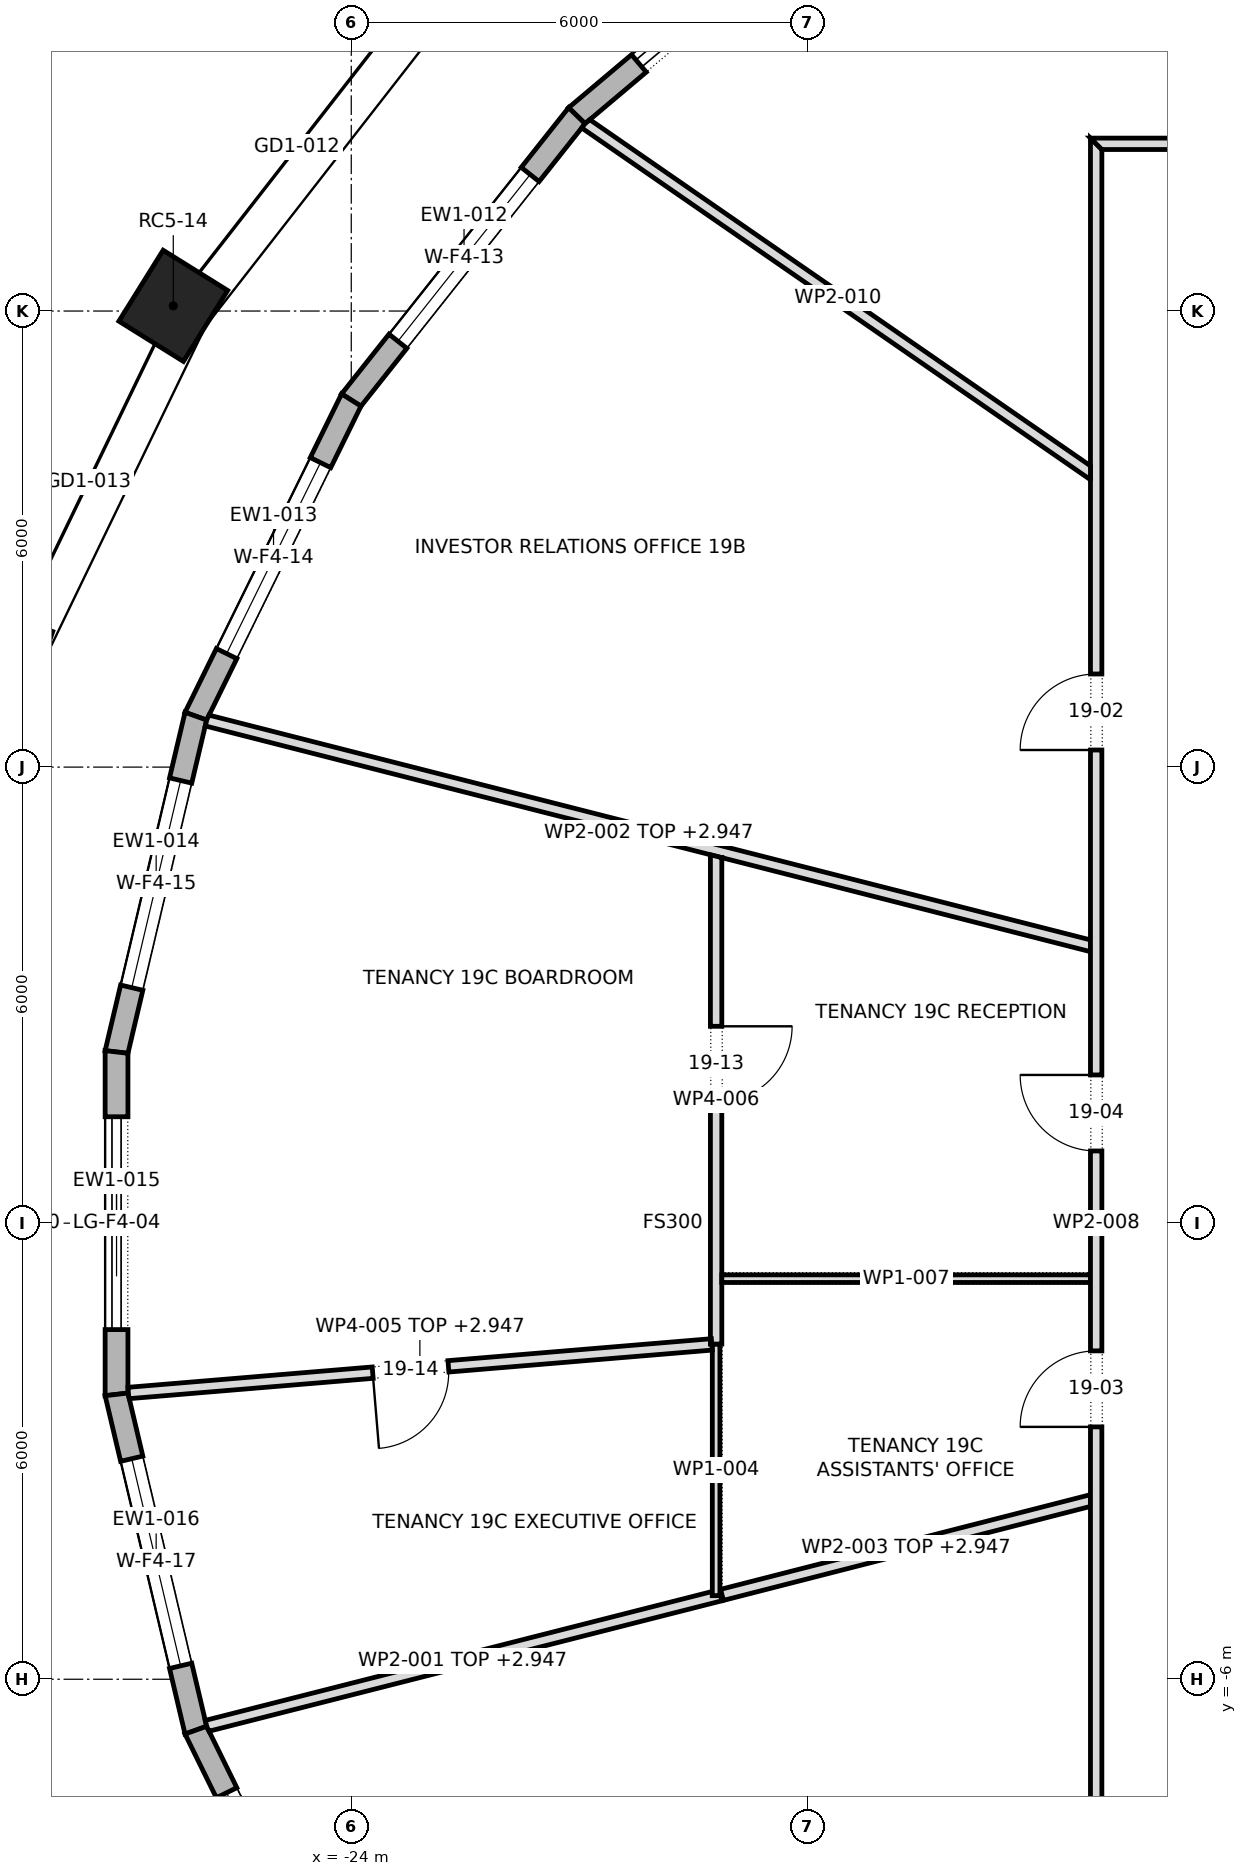
"""IFC4 building model, lengths in metres.
Left out: names, types, materials, properties, quantities, classifications, styles, units other than length and angle.
Written with IfcOpenShell. Run it as: python <this file> out.ifc"""

import sys

from ifc_helpers import new_model, si_unit, direction, frame, frame_2d, origin, origin_2d, place, context, subcontext, project, spatial, polyline, rectangle, outline, extrude, element, fill, save


model = new_model("IFC4")
c1 = context("Model", 3, precision=1e-05, world=origin(), true_north=direction((0.0, 1.0)))
c2 = subcontext(c1, "Body", "Model", "MODEL_VIEW")
j1 = project(units=[si_unit("LENGTHUNIT", "METRE"), si_unit("PLANEANGLEUNIT", "RADIAN")], contexts=[c1])
p1 = place(None, origin())
s1 = spatial("IfcSite", under=j1, at=p1, CompositionType="ELEMENT")
p2 = place(p1, origin())
s2 = spatial("IfcBuilding", under=s1, at=p2, CompositionType="ELEMENT")
p3 = place(p2, frame((0.0, 0.0, 268.3)))
s3 = spatial("IfcBuildingStorey", under=s2, at=p3, CompositionType="ELEMENT", Elevation=268.3)
for number, where, z_axis, x_axis in (
    (1, (-26.342, 12.069, 0.0), (0.0, 0.0, 1.0), (-0.529, -0.849, 0.0)),
    (2, (-28.582, 7.432, 0.0), (0.0, 0.0, 1.0), (-0.334, -0.943, 0.0)),
    (3, (-28.582, -7.432, 0.0), (0.0, 0.0, 1.0), (0.334, -0.943, 0.0)),
):
    element("IfcColumn", number, at=place(p3, frame(where, z_axis=z_axis, x_axis=x_axis)), inside=s3, PredefinedType="COLUMN", context=c2, shape_type="SweptSolid", body=[
        extrude(rectangle(XDim=1.1, YDim=1.0, at=origin_2d()), origin(), (0.0, 0.0, 1.0), 4.0),
    ])
p4 = place(p3, frame((-17.258, 17.75, 0.0), z_axis=(0.0, 0.0, 1.0), x_axis=(-0.764832940795, -0.644228664897, 0.0)))
e4 = element("IfcWall", 4, at=p4, inside=s3, PredefinedType="STANDARD", context=c2, shape_type="SweptSolid", body=[
    extrude(outline(polyline([(-0.014, -0.15), (4.95, -0.15), (4.92, 0.15), (0.014, 0.15), (-0.014, -0.15)])), origin(), (0.0, 0.0, 1.0), 3.7),
])
p5 = place(p4, frame((1.068, 0.0, 0.0)))
e5 = element("IfcOpeningElement", 5, at=p5, cuts=e4, PredefinedType="OPENING", context=c2, shape_type="SweptSolid", body=[
    extrude(rectangle(XDim=2.8, YDim=3.25, at=frame_2d((1.4, 1.625))), frame((0.0, 0.162, 0.0), z_axis=(0.0, -1.0, 0.0), x_axis=(1.0, 0.0, 0.0)), (0.0, 0.0, 1.0), 0.324),
])
p6 = place(p3, frame((-21.032, 14.57, 0.0), z_axis=(0.0, 0.0, 1.0), x_axis=(-0.621434755851, -0.783465917715, 0.0)))
e6 = element("IfcWall", 6, at=p6, inside=s3, PredefinedType="STANDARD", context=c2, shape_type="SweptSolid", body=[
    extrude(outline(polyline([(-0.015, -0.15), (4.791, -0.15), (4.759, 0.15), (0.015, 0.15), (-0.015, -0.15)])), origin(), (0.0, 0.0, 1.0), 3.7),
])
p7 = place(p6, frame((0.987, 0.0, 0.6)))
e7 = element("IfcOpeningElement", 7, at=p7, cuts=e6, PredefinedType="OPENING", context=c2, shape_type="SweptSolid", body=[
    extrude(rectangle(XDim=2.8, YDim=2.65, at=frame_2d((1.4, 1.325))), frame((0.0, 0.162, 0.0), z_axis=(0.0, -1.0, 0.0), x_axis=(1.0, 0.0, 0.0)), (0.0, 0.0, 1.0), 0.324),
])
p8 = place(p3, frame((-24.0, 10.829, 0.0), z_axis=(0.0, 0.0, 1.0), x_axis=(-0.441261940724, -0.897378348117, 0.0)))
e8 = element("IfcWall", 8, at=p8, inside=s3, PredefinedType="STANDARD", context=c2, shape_type="SweptSolid", body=[
    extrude(outline(polyline([(-0.016, -0.15), (4.652, -0.15), (4.618, 0.15), (0.016, 0.15), (-0.016, -0.15)])), origin(), (0.0, 0.0, 1.0), 3.7),
])
p9 = place(p8, frame((0.917, 0.0, 0.6)))
e9 = element("IfcOpeningElement", 9, at=p9, cuts=e8, PredefinedType="OPENING", context=c2, shape_type="SweptSolid", body=[
    extrude(rectangle(XDim=2.8, YDim=2.65, at=frame_2d((1.4, 1.325))), frame((0.0, 0.162, 0.0), z_axis=(0.0, -1.0, 0.0), x_axis=(1.0, 0.0, 0.0)), (0.0, 0.0, 1.0), 0.324),
])
p10 = place(p3, frame((-26.045, 6.67, 0.0), z_axis=(0.0, 0.0, 1.0), x_axis=(-0.22983372436, -0.973229910734, 0.0)))
e10 = element("IfcWall", 10, at=p10, inside=s3, PredefinedType="STANDARD", context=c2, shape_type="SweptSolid", body=[
    extrude(outline(polyline([(-0.017, -0.15), (4.557, -0.15), (4.521, 0.15), (0.017, 0.15), (-0.017, -0.15)])), origin(), (0.0, 0.0, 1.0), 3.7),
])
p11 = place(p10, frame((0.869, 0.0, 0.6)))
e11 = element("IfcOpeningElement", 11, at=p11, cuts=e10, PredefinedType="OPENING", context=c2, shape_type="SweptSolid", body=[
    extrude(rectangle(XDim=2.8, YDim=2.65, at=frame_2d((1.4, 1.325))), frame((0.0, 0.162, 0.0), z_axis=(0.0, -1.0, 0.0), x_axis=(1.0, 0.0, 0.0)), (0.0, 0.0, 1.0), 0.324),
])
p12 = place(p3, frame((-27.088, 2.252, 0.0), z_axis=(0.0, 0.0, 1.0), x_axis=(0.0, -1.0, 0.0)))
e12 = element("IfcWall", 12, at=p12, inside=s3, PredefinedType="STANDARD", context=c2, shape_type="SweptSolid", body=[
    extrude(outline(polyline([(-0.018, -0.15), (4.522, -0.15), (4.487, 0.15), (0.018, 0.15), (-0.018, -0.15)])), origin(), (0.0, 0.0, 1.0), 3.7),
])
p13 = place(p12, frame((0.852, 0.0, 0.0)))
e13 = element("IfcOpeningElement", 13, at=p13, cuts=e12, PredefinedType="OPENING", context=c2, shape_type="SweptSolid", body=[
    extrude(rectangle(XDim=2.8, YDim=3.25, at=frame_2d((1.4, 1.625))), frame((0.0, 0.162, 0.0), z_axis=(0.0, -1.0, 0.0), x_axis=(1.0, 0.0, 0.0)), (0.0, 0.0, 1.0), 0.324),
])
p14 = place(p3, frame((-27.088, -2.252, 0.0), z_axis=(0.0, 0.0, 1.0), x_axis=(0.22983372436, -0.973229910734, 0.0)))
e14 = element("IfcWall", 14, at=p14, inside=s3, PredefinedType="STANDARD", context=c2, shape_type="SweptSolid", body=[
    extrude(outline(polyline([(-0.018, -0.15), (4.556, -0.15), (4.522, 0.15), (0.018, 0.15), (-0.018, -0.15)])), origin(), (0.0, 0.0, 1.0), 3.7),
])
p15 = place(p14, frame((0.869, 0.0, 0.6)))
e15 = element("IfcOpeningElement", 15, at=p15, cuts=e14, PredefinedType="OPENING", context=c2, shape_type="SweptSolid", body=[
    extrude(rectangle(XDim=2.8, YDim=2.65, at=frame_2d((1.4, 1.325))), frame((0.0, 0.162, 0.0), z_axis=(0.0, -1.0, 0.0), x_axis=(1.0, 0.0, 0.0)), (0.0, 0.0, 1.0), 0.324),
])
p16 = place(p3, frame((-26.045, -6.67, 0.0), z_axis=(0.0, 0.0, 1.0), x_axis=(0.441261940724, -0.897378348117, 0.0)))
e16 = element("IfcWall", 16, at=p16, inside=s3, PredefinedType="STANDARD", context=c2, shape_type="SweptSolid", body=[
    extrude(outline(polyline([(-0.017, -0.15), (4.651, -0.15), (4.619, 0.15), (0.017, 0.15), (-0.017, -0.15)])), origin(), (0.0, 0.0, 1.0), 3.7),
])
p17 = place(p16, frame((0.917, 0.0, 0.6)))
e17 = element("IfcOpeningElement", 17, at=p17, cuts=e16, PredefinedType="OPENING", context=c2, shape_type="SweptSolid", body=[
    extrude(rectangle(XDim=2.8, YDim=2.65, at=frame_2d((1.4, 1.325))), frame((0.0, 0.162, 0.0), z_axis=(0.0, -1.0, 0.0), x_axis=(1.0, 0.0, 0.0)), (0.0, 0.0, 1.0), 0.324),
])
p18 = place(p3, frame((-25.902, -6.614, 0.0), z_axis=(0.0, 0.0, 1.0), x_axis=(0.969153959709, 0.246456086108, 0.0)))
e18 = element("IfcWall", 18, at=p18, inside=s3, PredefinedType="PARTITIONING", context=c2, shape_type="SweptSolid", body=[
    extrude(outline(polyline([(0.013, -0.075), (1.756, -0.075), (3.5, -0.075), (5.243, -0.075), (6.986, -0.075), (6.986, 0.072), (6.967, -0.003), (6.87, 0.022), (6.883, 0.075), (5.162, 0.075), (3.442, 0.075), (1.721, 0.075), (0.0, 0.075), (0.0, -0.012), (0.013, -0.075)])), origin(), (0.0, 0.0, 1.0), 2.947),
])
p19 = place(p3, frame((-25.902, 6.614, 0.0), z_axis=(0.0, 0.0, 1.0), x_axis=(0.968990601513, -0.247097580277, 0.0)))
e19 = element("IfcWall", 19, at=p19, inside=s3, PredefinedType="PARTITIONING", context=c2, shape_type="SweptSolid", body=[
    extrude(outline(polyline([(0.0, -0.075), (1.752, -0.075), (3.504, -0.075), (5.256, -0.075), (7.008, -0.075), (7.013, -0.074), (7.013, -0.075), (8.682, -0.075), (10.35, -0.075), (12.019, -0.075), (11.98, 0.075), (9.986, 0.075), (7.991, 0.075), (5.997, 0.075), (4.002, 0.075), (2.008, 0.075), (0.013, 0.075), (0.0, 0.012), (0.0, -0.075)])), origin(), (0.0, 0.0, 1.0), 2.947),
])
p20 = place(p3, frame((-19.132, -4.893, 0.0), z_axis=(0.0, 0.0, 1.0), x_axis=(0.968763144659, 0.247987841537, 0.0)))
e20 = element("IfcWall", 20, at=p20, inside=s3, PredefinedType="PARTITIONING", context=c2, shape_type="SweptSolid", body=[
    extrude(outline(polyline([(0.0, -0.075), (1.665, -0.075), (3.33, -0.075), (4.994, -0.075), (5.033, 0.074), (5.033, 0.075), (3.355, 0.075), (1.678, 0.075), (0.001, 0.075), (0.0, 0.072), (0.0, -0.075)])), origin(), (0.0, 0.0, 1.0), 2.947),
])
p21 = place(p3, frame((-19.2, -4.9, 0.0), z_axis=(0.0, 0.0, 1.0), x_axis=(0.0, 1.0, 0.0)))
e21 = element("IfcWall", 21, at=p21, inside=s3, PredefinedType="PARTITIONING", context=c2, shape_type="SweptSolid", body=[
    extrude(rectangle(XDim=3.31, YDim=0.1, at=frame_2d((1.655, 0.0))), origin(), (0.0, 0.0, 1.0), 3.7),
])
p22 = place(p3, frame((-19.256, -1.595, 0.0), z_axis=(0.0, 0.0, 1.0), x_axis=(-0.996545321007, -0.083050726542, 0.0)))
e22 = element("IfcWall", 22, at=p22, inside=s3, PredefinedType="PARTITIONING", context=c2, shape_type="SweptSolid", body=[
    extrude(outline(polyline([(7.702, -0.075), (7.702, 0.043), (7.697, 0.075), (5.773, 0.075), (3.849, 0.075), (1.924, 0.075), (0.0, 0.075), (0.0, -0.005), (0.018, -0.006), (0.012, -0.075), (1.935, -0.075), (3.857, -0.075), (5.78, -0.075), (7.702, -0.075)])), origin(), (0.0, 0.0, 1.0), 2.947),
])
p23 = place(p22, frame((3.477, 0.0, 0.0)))
e23 = element("IfcOpeningElement", 23, at=p23, cuts=e22, PredefinedType="OPENING", context=c2, shape_type="SweptSolid", body=[
    extrude(rectangle(XDim=1.0, YDim=2.1, at=frame_2d((0.5, 1.05))), frame((0.0, 0.087, 0.0), z_axis=(0.0, -1.0, 0.0), x_axis=(1.0, 0.0, 0.0)), (0.0, 0.0, 1.0), 0.174),
])
p24 = place(p3, frame((-19.2, -1.59, 0.0), z_axis=(0.0, 0.0, 1.0), x_axis=(0.0, 1.0, 0.0)))
e24 = element("IfcWall", 24, at=p24, inside=s3, PredefinedType="PARTITIONING", context=c2, shape_type="SweptSolid", body=[
    extrude(outline(polyline([(0.0, -0.075), (0.81, -0.075), (0.91, -0.075), (2.74, -0.075), (4.569, -0.075), (6.399, -0.075), (6.437, 0.074), (6.437, 0.075), (4.845, 0.075), (3.253, 0.075), (1.661, 0.075), (0.069, 0.075), (0.07, 0.062), (0.0, 0.057), (0.0, 0.05), (0.0, 0.05), (0.0, -0.05), (0.0, -0.05), (0.0, -0.075)])), origin(), (0.0, 0.0, 1.0), 3.7),
])
p25 = place(p24, frame((3.18, 0.0, 0.0)))
e25 = element("IfcOpeningElement", 25, at=p25, cuts=e24, PredefinedType="OPENING", context=c2, shape_type="SweptSolid", body=[
    extrude(rectangle(XDim=1.0, YDim=2.1, at=frame_2d((0.5, 1.05))), frame((0.0, 0.087, 0.0), z_axis=(0.0, -1.0, 0.0), x_axis=(1.0, 0.0, 0.0)), (0.0, 0.0, 1.0), 0.174),
])
p26 = place(p3, frame((-19.125, -0.73, 0.0), z_axis=(0.0, 0.0, 1.0), x_axis=(1.0, 0.0, 0.0)))
e26 = element("IfcWall", 26, at=p26, inside=s3, PredefinedType="PARTITIONING", context=c2, shape_type="SweptSolid", body=[
    extrude(rectangle(XDim=4.85, YDim=0.1, at=frame_2d((2.425, 0.0))), origin(), (0.0, 0.0, 1.0), 3.7),
])
p27 = place(p3, frame((-14.2, -14.275, 0.0), z_axis=(0.0, 0.0, 1.0), x_axis=(0.0, 1.0, 0.0)))
e27 = element("IfcWall", 27, at=p27, inside=s3, PredefinedType="PARTITIONING", context=c2, shape_type="SweptSolid", body=[
    extrude(outline(polyline([(0.15, -0.075), (2.033, -0.075), (3.917, -0.075), (5.8, -0.075), (7.683, -0.075), (9.567, -0.075), (11.45, -0.075), (13.333, -0.075), (15.217, -0.075), (17.1, -0.075), (18.983, -0.075), (20.866, -0.075), (22.75, -0.075), (24.633, -0.075), (26.517, -0.075), (28.4, -0.075), (28.55, 0.075), (28.55, 0.075), (26.646, 0.075), (24.743, 0.075), (22.84, 0.075), (20.937, 0.075), (19.033, 0.075), (17.13, 0.075), (15.227, 0.075), (13.323, 0.075), (11.42, 0.075), (9.517, 0.075), (7.613, 0.075), (5.71, 0.075), (3.807, 0.075), (1.903, 0.075), (0.0, 0.075), (0.15, -0.075)])), origin(), (0.0, 0.0, 1.0), 3.7),
])
p28 = place(p27, frame((20.5, 0.0, 0.0)))
e28 = element("IfcOpeningElement", 28, at=p28, cuts=e27, PredefinedType="OPENING", context=c2, shape_type="SweptSolid", body=[
    extrude(rectangle(XDim=1.0, YDim=2.1, at=frame_2d((0.5, 1.05))), frame((0.0, 0.087, 0.0), z_axis=(0.0, -1.0, 0.0), x_axis=(1.0, 0.0, 0.0)), (0.0, 0.0, 1.0), 0.174),
])
p29 = place(p27, frame((11.595, 0.0, 0.0)))
e29 = element("IfcOpeningElement", 29, at=p29, cuts=e27, PredefinedType="OPENING", context=c2, shape_type="SweptSolid", body=[
    extrude(rectangle(XDim=1.0, YDim=2.1, at=frame_2d((0.5, 1.05))), frame((0.0, 0.087, 0.0), z_axis=(0.0, -1.0, 0.0), x_axis=(1.0, 0.0, 0.0)), (0.0, 0.0, 1.0), 0.174),
])
p30 = place(p27, frame((15.225, 0.0, 0.0)))
e30 = element("IfcOpeningElement", 30, at=p30, cuts=e27, PredefinedType="OPENING", context=c2, shape_type="SweptSolid", body=[
    extrude(rectangle(XDim=1.0, YDim=2.1, at=frame_2d((0.5, 1.05))), frame((0.0, 0.087, 0.0), z_axis=(0.0, -1.0, 0.0), x_axis=(1.0, 0.0, 0.0)), (0.0, 0.0, 1.0), 0.174),
])
p31 = place(p27, frame((4.86, 0.0, 0.0)))
e31 = element("IfcOpeningElement", 31, at=p31, cuts=e27, PredefinedType="OPENING", context=c2, shape_type="SweptSolid", body=[
    extrude(rectangle(XDim=1.0, YDim=2.1, at=frame_2d((0.5, 1.05))), frame((0.0, 0.087, 0.0), z_axis=(0.0, -1.0, 0.0), x_axis=(1.0, 0.0, 0.0)), (0.0, 0.0, 1.0), 0.174),
])
p32 = place(p3, frame((-14.232, 9.843, 0.0), z_axis=(0.0, 0.0, 1.0), x_axis=(-0.822495571588, 0.56877151363, 0.0)))
e32 = element("IfcWall", 32, at=p32, inside=s3, PredefinedType="PARTITIONING", context=c2, shape_type="SweptSolid", body=[
    extrude(outline(polyline([(0.104, -0.075), (1.705, -0.075), (3.307, -0.075), (4.908, -0.075), (6.51, -0.075), (8.112, -0.075), (8.133, 0.004), (8.137, 0.07), (8.137, 0.075), (6.51, 0.075), (4.883, 0.075), (3.255, 0.075), (1.627, 0.075), (0.0, 0.075), (0.0, 0.075), (0.104, -0.075)])), origin(), (0.0, 0.0, 1.0), 3.7),
])
p33 = place(p3, frame((-14.275, 14.2, 0.0), z_axis=(0.0, 0.0, 1.0), x_axis=(1.0, 0.0, 0.0)))
e33 = element("IfcWall", 33, at=p33, inside=s3, PredefinedType="PARTITIONING", context=c2, shape_type="SweptSolid", body=[
    extrude(outline(polyline([(0.15, -0.075), (2.033, -0.075), (3.917, -0.075), (5.8, -0.075), (7.683, -0.075), (9.567, -0.075), (11.45, -0.075), (13.333, -0.075), (15.217, -0.075), (17.1, -0.075), (18.983, -0.075), (20.866, -0.075), (22.75, -0.075), (24.633, -0.075), (26.517, -0.075), (28.4, -0.075), (28.55, 0.075), (28.55, 0.075), (26.646, 0.075), (24.743, 0.075), (22.84, 0.075), (20.937, 0.075), (19.033, 0.075), (17.13, 0.075), (15.227, 0.075), (13.323, 0.075), (11.42, 0.075), (9.517, 0.075), (7.613, 0.075), (5.71, 0.075), (3.807, 0.075), (1.903, 0.075), (0.0, 0.075), (0.15, -0.075)])), origin(), (0.0, 0.0, 1.0), 3.7),
])
p34 = place(p33, frame((5.845, 0.0, 0.0)))
e34 = element("IfcOpeningElement", 34, at=p34, cuts=e33, PredefinedType="OPENING", context=c2, shape_type="SweptSolid", body=[
    extrude(rectangle(XDim=1.0, YDim=2.1, at=frame_2d((0.5, 1.05))), frame((0.0, 0.087, 0.0), z_axis=(0.0, -1.0, 0.0), x_axis=(1.0, 0.0, 0.0)), (0.0, 0.0, 1.0), 0.174),
])
p35 = place(p33, frame((19.86, 0.0, 0.0)))
e35 = element("IfcOpeningElement", 35, at=p35, cuts=e33, PredefinedType="OPENING", context=c2, shape_type="SweptSolid", body=[
    extrude(rectangle(XDim=1.0, YDim=2.1, at=frame_2d((0.5, 1.05))), frame((0.0, 0.087, 0.0), z_axis=(0.0, -1.0, 0.0), x_axis=(1.0, 0.0, 0.0)), (0.0, 0.0, 1.0), 0.174),
])
p36 = place(p5, origin())
e36 = element("IfcDoor", 36, at=p36, inside=s3, OperationType="DOUBLE_DOOR_SLIDING", PredefinedType="DOOR", context=c2, shape_type="SweptSolid", body=[
    extrude(rectangle(XDim=2.8, YDim=3.25, at=frame_2d((1.4, 1.625))), frame((0.0, 0.025, 0.0), z_axis=(0.0, -1.0, 0.0), x_axis=(1.0, 0.0, 0.0)), (0.0, 0.0, 1.0), 0.05),
])
fill(e5, e36)
p37 = place(p7, origin())
e37 = element("IfcWindow", 37, at=p37, inside=s3, PartitioningType="DOUBLE_PANEL_VERTICAL", PredefinedType="WINDOW", context=c2, shape_type="SweptSolid", body=[
    extrude(rectangle(XDim=2.8, YDim=2.65, at=frame_2d((1.4, 1.325))), frame((0.0, 0.03, 0.0), z_axis=(0.0, -1.0, 0.0), x_axis=(1.0, 0.0, 0.0)), (0.0, 0.0, 1.0), 0.06),
])
fill(e7, e37)
p38 = place(p9, origin())
e38 = element("IfcWindow", 38, at=p38, inside=s3, PartitioningType="DOUBLE_PANEL_VERTICAL", PredefinedType="WINDOW", context=c2, shape_type="SweptSolid", body=[
    extrude(rectangle(XDim=2.8, YDim=2.65, at=frame_2d((1.4, 1.325))), frame((0.0, 0.03, 0.0), z_axis=(0.0, -1.0, 0.0), x_axis=(1.0, 0.0, 0.0)), (0.0, 0.0, 1.0), 0.06),
])
fill(e9, e38)
p39 = place(p11, origin())
e39 = element("IfcWindow", 39, at=p39, inside=s3, PartitioningType="DOUBLE_PANEL_VERTICAL", PredefinedType="WINDOW", context=c2, shape_type="SweptSolid", body=[
    extrude(rectangle(XDim=2.8, YDim=2.65, at=frame_2d((1.4, 1.325))), frame((0.0, 0.03, 0.0), z_axis=(0.0, -1.0, 0.0), x_axis=(1.0, 0.0, 0.0)), (0.0, 0.0, 1.0), 0.06),
])
fill(e11, e39)
p40 = place(p13, origin())
e40 = element("IfcDoor", 40, at=p40, inside=s3, OperationType="DOUBLE_DOOR_SLIDING", PredefinedType="DOOR", context=c2, shape_type="SweptSolid", body=[
    extrude(rectangle(XDim=2.8, YDim=3.25, at=frame_2d((1.4, 1.625))), frame((0.0, 0.025, 0.0), z_axis=(0.0, -1.0, 0.0), x_axis=(1.0, 0.0, 0.0)), (0.0, 0.0, 1.0), 0.05),
])
fill(e13, e40)
p41 = place(p15, origin())
e41 = element("IfcWindow", 41, at=p41, inside=s3, PartitioningType="DOUBLE_PANEL_VERTICAL", PredefinedType="WINDOW", context=c2, shape_type="SweptSolid", body=[
    extrude(rectangle(XDim=2.8, YDim=2.65, at=frame_2d((1.4, 1.325))), frame((0.0, 0.03, 0.0), z_axis=(0.0, -1.0, 0.0), x_axis=(1.0, 0.0, 0.0)), (0.0, 0.0, 1.0), 0.06),
])
fill(e15, e41)
p42 = place(p17, origin())
e42 = element("IfcWindow", 42, at=p42, inside=s3, PartitioningType="DOUBLE_PANEL_VERTICAL", PredefinedType="WINDOW", context=c2, shape_type="SweptSolid", body=[
    extrude(rectangle(XDim=2.8, YDim=2.65, at=frame_2d((1.4, 1.325))), frame((0.0, 0.03, 0.0), z_axis=(0.0, -1.0, 0.0), x_axis=(1.0, 0.0, 0.0)), (0.0, 0.0, 1.0), 0.06),
])
fill(e17, e42)
p43 = place(p28, origin())
e43 = element("IfcDoor", 43, at=p43, inside=s3, OperationType="SINGLE_SWING_RIGHT", PredefinedType="DOOR", context=c2, shape_type="SweptSolid", body=[
    extrude(rectangle(XDim=1.0, YDim=2.1, at=frame_2d((0.5, 1.05))), frame((0.0, 0.025, 0.0), z_axis=(0.0, -1.0, 0.0), x_axis=(1.0, 0.0, 0.0)), (0.0, 0.0, 1.0), 0.05),
])
fill(e28, e43)
p44 = place(p29, origin())
e44 = element("IfcDoor", 44, at=p44, inside=s3, OperationType="SINGLE_SWING_RIGHT", PredefinedType="DOOR", context=c2, shape_type="SweptSolid", body=[
    extrude(rectangle(XDim=1.0, YDim=2.1, at=frame_2d((0.5, 1.05))), frame((0.0, 0.025, 0.0), z_axis=(0.0, -1.0, 0.0), x_axis=(1.0, 0.0, 0.0)), (0.0, 0.0, 1.0), 0.05),
])
fill(e29, e44)
p45 = place(p30, origin())
e45 = element("IfcDoor", 45, at=p45, inside=s3, OperationType="SINGLE_SWING_LEFT", PredefinedType="DOOR", context=c2, shape_type="SweptSolid", body=[
    extrude(rectangle(XDim=1.0, YDim=2.1, at=frame_2d((0.5, 1.05))), frame((0.0, 0.025, 0.0), z_axis=(0.0, -1.0, 0.0), x_axis=(1.0, 0.0, 0.0)), (0.0, 0.0, 1.0), 0.05),
])
fill(e30, e45)
p46 = place(p25, frame((1.0, 0.0, 0.0), z_axis=(0.0, 0.0, 1.0), x_axis=(-1.0, 0.0, 0.0)))
e46 = element("IfcDoor", 46, at=p46, inside=s3, OperationType="SINGLE_SWING_RIGHT", PredefinedType="DOOR", context=c2, shape_type="SweptSolid", body=[
    extrude(rectangle(XDim=1.0, YDim=2.1, at=frame_2d((0.5, 1.05))), frame((0.0, 0.025, 0.0), z_axis=(0.0, -1.0, 0.0), x_axis=(1.0, 0.0, 0.0)), (0.0, 0.0, 1.0), 0.05),
])
fill(e25, e46)
p47 = place(p23, origin())
e47 = element("IfcDoor", 47, at=p47, inside=s3, OperationType="SINGLE_SWING_LEFT", PredefinedType="DOOR", context=c2, shape_type="SweptSolid", body=[
    extrude(rectangle(XDim=1.0, YDim=2.1, at=frame_2d((0.5, 1.05))), frame((0.0, 0.025, 0.0), z_axis=(0.0, -1.0, 0.0), x_axis=(1.0, 0.0, 0.0)), (0.0, 0.0, 1.0), 0.05),
])
fill(e23, e47)
save(model, sys.argv[1])
